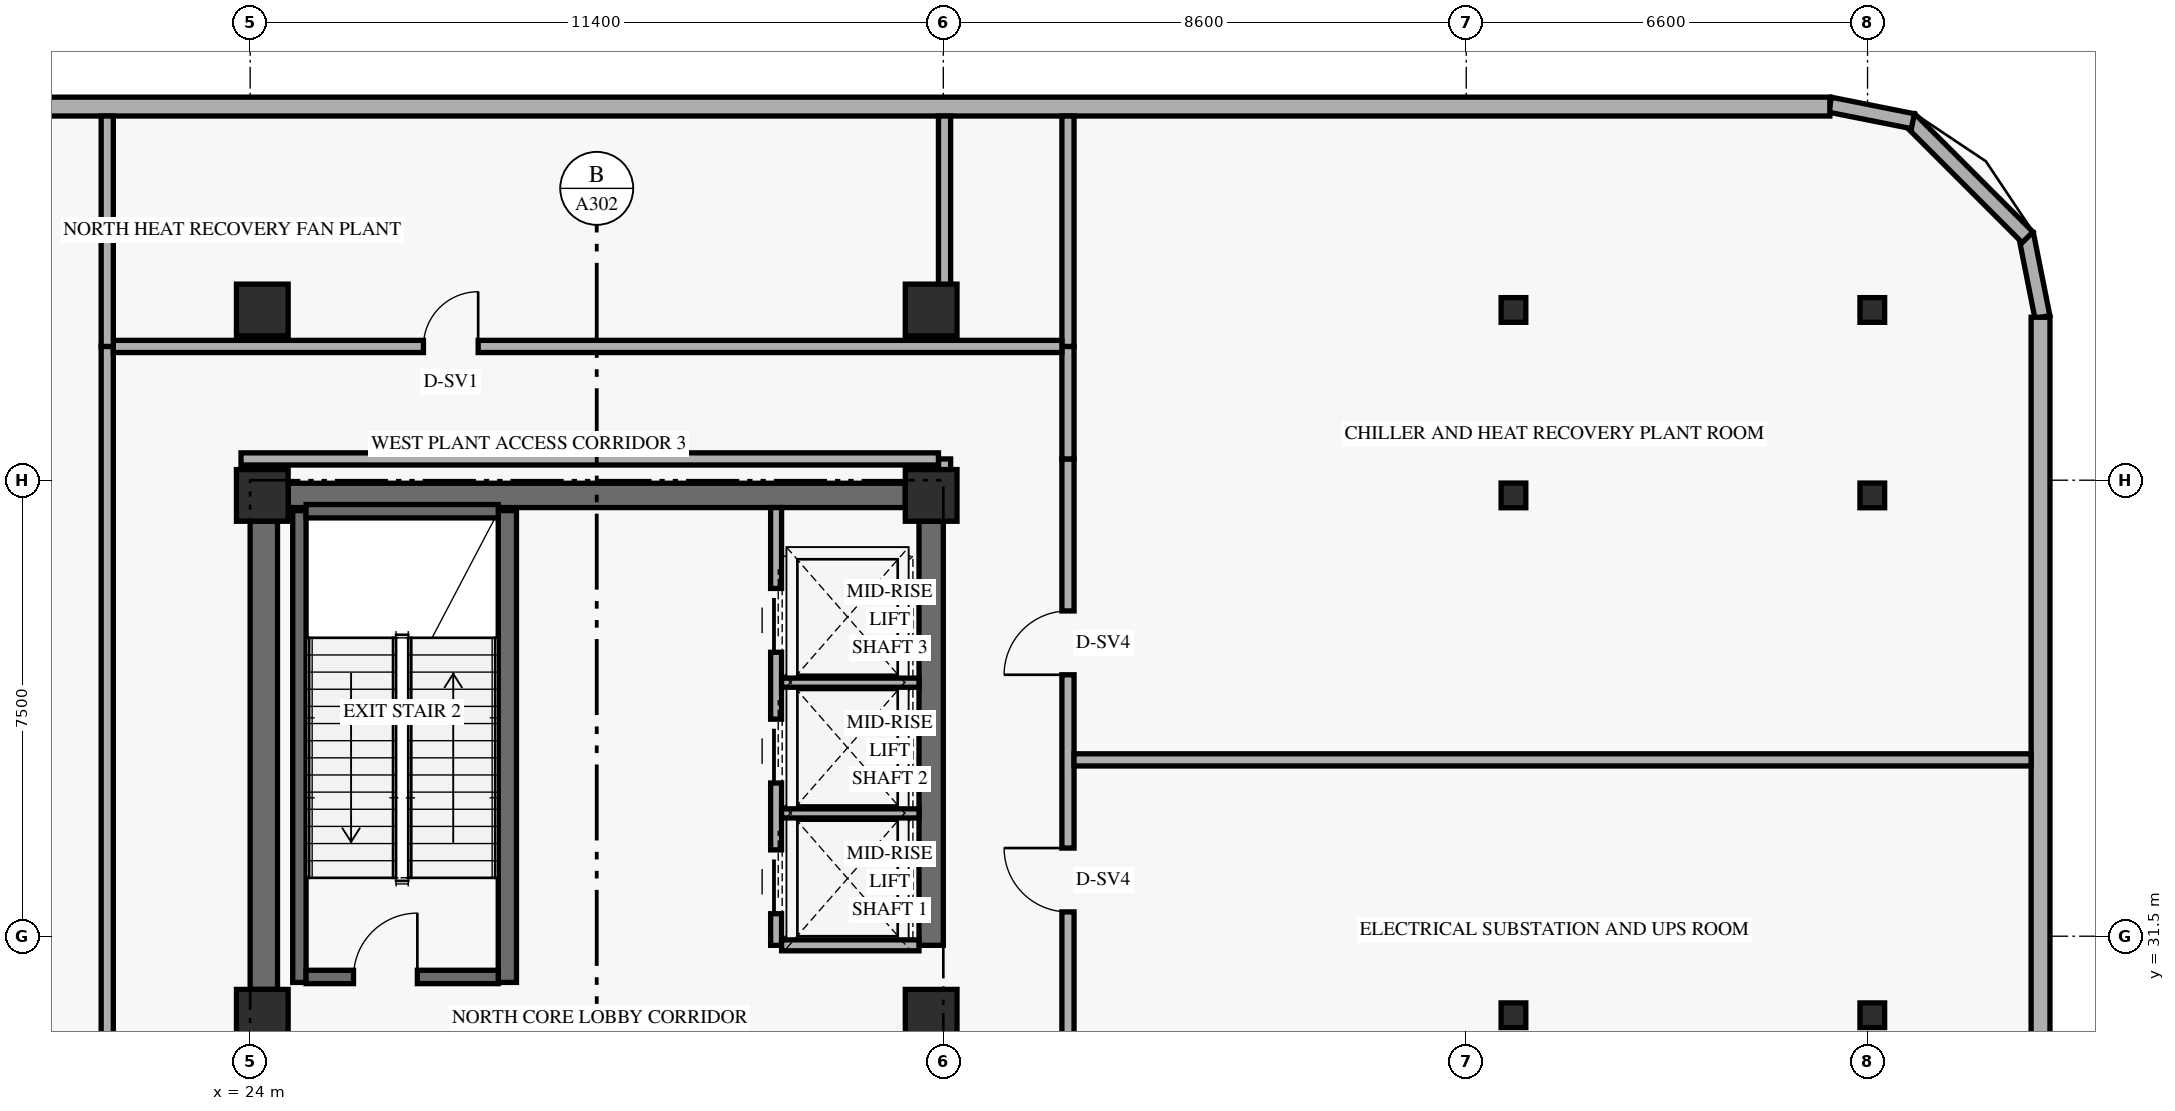
"""IFC4 building model, lengths in metres.
Left out: names, types, materials, properties, quantities, classifications, styles, units other than length and angle.
Written with IfcOpenShell. Run it as: python <this file> out.ifc"""

import sys

from ifc_helpers import new_model, si_unit, direction, frame, frame_2d, origin, origin_2d, place, context, subcontext, project, spatial, rectangle, hollow_rectangle, extrude, element, fill, save


model = new_model("IFC4")
c1 = context("Model", 3, precision=1e-05, world=origin(), true_north=direction((0.0, 1.0)))
c2 = subcontext(c1, "Body", "Model", "MODEL_VIEW")
j1 = project(units=[si_unit("LENGTHUNIT", "METRE"), si_unit("PLANEANGLEUNIT", "RADIAN")], contexts=[c1])
p1 = place(None, origin())
s1 = spatial("IfcSite", under=j1, at=p1, CompositionType="ELEMENT")
p2 = place(p1, origin())
s2 = spatial("IfcBuilding", under=s1, at=p2, CompositionType="ELEMENT")
p3 = place(p2, frame((0.0, 0.0, 135.6)))
s3 = spatial("IfcBuildingStorey", under=s2, at=p3, CompositionType="ELEMENT", Elevation=135.6)
p4 = place(p3, frame((24.225, 30.625, 0.0), z_axis=(0.0, 0.0, 1.0), x_axis=(0.0, 1.0, 0.0)))
e1 = element("IfcWall", 1, at=p4, inside=s3, PredefinedType="SHEAR", context=c2, shape_type="SweptSolid", body=[
    extrude(rectangle(XDim=7.7, YDim=0.45, at=frame_2d((3.85, 0.0))), origin(), (0.0, 0.0, 1.0), 4.549),
])
p5 = place(p3, frame((35.2, 31.35, 0.0), z_axis=(0.0, 0.0, 1.0), x_axis=(0.0, 1.0, 0.0)))
e2 = element("IfcWall", 2, at=p5, inside=s3, PredefinedType="SHEAR", context=c2, shape_type="SweptSolid", body=[
    extrude(rectangle(XDim=6.975, YDim=0.4, at=frame_2d((3.487, 0.0))), origin(), (0.0, 0.0, 1.0), 4.549),
])
p6 = place(p3, frame((24.625, 38.75, 0.0), z_axis=(0.0, 0.0, 1.0), x_axis=(1.0, 0.0, 0.0)))
e3 = element("IfcWall", 3, at=p6, inside=s3, PredefinedType="SHEAR", context=c2, shape_type="SweptSolid", body=[
    extrude(rectangle(XDim=10.15, YDim=0.4, at=frame_2d((5.075, 0.0))), origin(), (0.0, 0.0, 1.0), 5.16),
])
p7 = place(p3, frame((24.81, 30.74, 0.0), z_axis=(0.0, 0.0, 1.0), x_axis=(0.0, 1.0, 0.0)))
e4 = element("IfcWall", 4, at=p7, inside=s3, PredefinedType="SHEAR", context=c2, shape_type="SweptSolid", body=[
    extrude(rectangle(XDim=7.76, YDim=0.22, at=frame_2d((3.88, 0.0))), origin(), (0.0, 0.0, 1.0), 5.16),
])
p8 = place(p3, frame((28.23, 30.74, 0.0), z_axis=(0.0, 0.0, 1.0), x_axis=(0.0, 1.0, 0.0)))
e5 = element("IfcWall", 5, at=p8, inside=s3, PredefinedType="SHEAR", context=c2, shape_type="SweptSolid", body=[
    extrude(rectangle(XDim=7.76, YDim=0.3, at=frame_2d((3.88, 0.0))), origin(), (0.0, 0.0, 1.0), 5.16),
])
p9 = place(p3, frame((24.92, 30.83, 0.0), z_axis=(0.0, 0.0, 1.0), x_axis=(1.0, 0.0, 0.0)))
e6 = element("IfcWall", 6, at=p9, inside=s3, PredefinedType="SHEAR", context=c2, shape_type="SweptSolid", body=[
    extrude(rectangle(XDim=3.16, YDim=0.22, at=frame_2d((1.58, 0.0))), origin(), (0.0, 0.0, 1.0), 5.16),
])
p10 = place(p9, frame((0.78, 0.0, 0.0)))
e7 = element("IfcOpeningElement", 7, at=p10, cuts=e6, PredefinedType="OPENING", context=c2, shape_type="SweptSolid", body=[
    extrude(rectangle(XDim=1.05, YDim=2.15, at=frame_2d((0.525, 1.075))), frame((0.0, 0.12, 0.0), z_axis=(0.0, -1.0, 0.0), x_axis=(1.0, 0.0, 0.0)), (0.0, 0.0, 1.0), 0.24),
])
p11 = place(p3, frame((24.92, 38.49, 0.0), z_axis=(0.0, 0.0, 1.0), x_axis=(1.0, 0.0, 0.0)))
e8 = element("IfcWall", 8, at=p11, inside=s3, PredefinedType="SHEAR", context=c2, shape_type="SweptSolid", body=[
    extrude(rectangle(XDim=3.16, YDim=0.22, at=frame_2d((1.58, 0.0))), origin(), (0.0, 0.0, 1.0), 5.16),
])
for number, where, z_axis, x_axis in (
    (9, (24.2, 30.2, 0.0), (0.0, 0.0, 1.0), (1.0, 0.0, 0.0)),
    (10, (24.2, 38.75, 0.0), (0.0, 0.0, 1.0), (1.0, 0.0, 0.0)),
    (11, (24.2, 41.8, 0.0), (0.0, 0.0, 1.0), (1.0, 0.0, 0.0)),
    (12, (35.2, 30.2, 0.0), (0.0, 0.0, 1.0), (1.0, 0.0, 0.0)),
    (13, (35.2, 38.75, 0.0), (0.0, 0.0, 1.0), (1.0, 0.0, 0.0)),
    (14, (35.2, 41.8, 0.0), (0.0, 0.0, 1.0), (1.0, 0.0, 0.0)),
):
    element("IfcColumn", number, at=place(p3, frame(where, z_axis=z_axis, x_axis=x_axis)), inside=s3, PredefinedType="COLUMN", context=c2, shape_type="SweptSolid", body=[
        extrude(rectangle(XDim=0.85, YDim=0.85, at=origin_2d()), origin(), (0.0, 0.0, 1.0), 5.4),
    ])
for number, where, z_axis, x_axis in (
    (15, (44.682, 30.2, 0.0), (0.035, 0.0, 0.999), (0.0, 1.0, 0.0)),
    (16, (44.682, 38.75, 0.0), (0.035, 0.0, 0.999), (0.0, 1.0, 0.0)),
    (17, (44.682, 41.8, 0.0), (0.035, 0.0, 0.999), (0.0, 1.0, 0.0)),
):
    element("IfcColumn", number, at=place(p3, frame(where, z_axis=z_axis, x_axis=x_axis)), inside=s3, PredefinedType="COLUMN", context=c2, shape_type="SweptSolid", body=[
        extrude(hollow_rectangle(XDim=0.406, YDim=0.406, WallThickness=0.016, at=origin_2d()), origin(), (0.0, 0.0, 1.0), 5.403),
    ])
for number, where, z_axis, x_axis in (
    (18, (50.521, 30.2, 0.0), (0.058, 0.0, 0.998), (0.0, 1.0, 0.0)),
    (19, (50.521, 38.75, 0.0), (0.058, 0.0, 0.998), (0.0, 1.0, 0.0)),
    (20, (50.521, 41.8, 0.0), (0.058, 0.0, 0.998), (0.0, 1.0, 0.0)),
):
    element("IfcColumn", number, at=place(p3, frame(where, z_axis=z_axis, x_axis=x_axis)), inside=s3, PredefinedType="COLUMN", context=c2, shape_type="SweptSolid", body=[
        extrude(hollow_rectangle(XDim=0.406, YDim=0.406, WallThickness=0.016, at=origin_2d()), origin(), (0.0, 0.0, 1.0), 5.409),
    ])
p12 = place(p3, frame((53.476, 41.684, 0.0), z_axis=(0.0, 0.0, 1.0), x_axis=(-0.195000137217, 0.980803214965, 0.0)))
e21 = element("IfcWall", 21, at=p12, inside=s3, PredefinedType="SOLIDWALL", context=c2, shape_type="SweptSolid", body=[
    extrude(rectangle(XDim=1.388, YDim=0.25, at=frame_2d((0.694, 0.0))), origin(), (0.0, 0.0, 1.0), 5.16),
])
p13 = place(p3, frame((53.232, 42.995, 0.0), z_axis=(0.0, 0.0, 1.0), x_axis=(-0.707151344399, 0.707062215165, 0.0)))
e22 = element("IfcWall", 22, at=p13, inside=s3, PredefinedType="SOLIDWALL", context=c2, shape_type="SweptSolid", body=[
    extrude(rectangle(XDim=2.739, YDim=0.25, at=frame_2d((1.37, 0.0))), origin(), (0.0, 0.0, 1.0), 5.16),
])
p14 = place(p3, frame((51.345, 44.905, 0.0), z_axis=(0.0, 0.0, 1.0), x_axis=(-0.980809899341, 0.19496651342, 0.0)))
e23 = element("IfcWall", 23, at=p14, inside=s3, PredefinedType="SOLIDWALL", context=c2, shape_type="SweptSolid", body=[
    extrude(rectangle(XDim=1.389, YDim=0.25, at=frame_2d((0.694, 0.0))), origin(), (0.0, 0.0, 1.0), 5.16),
])
p15 = place(p3, frame((53.445, 6.32, 0.0), z_axis=(0.0, 0.0, 1.0), x_axis=(0.0, 1.0, 0.0)))
e24 = element("IfcWall", 24, at=p15, inside=s3, PredefinedType="SOLIDWALL", context=c2, shape_type="SweptSolid", body=[
    extrude(rectangle(XDim=35.36, YDim=0.31, at=frame_2d((17.68, 0.0))), origin(), (0.0, 0.0, 1.0), 5.16),
])
p16 = place(p3, frame((49.98, 45.145, 0.0), z_axis=(0.0, 0.0, 1.0), x_axis=(-1.0, 0.0, 0.0)))
e25 = element("IfcWall", 25, at=p16, inside=s3, PredefinedType="SOLIDWALL", context=c2, shape_type="SweptSolid", body=[
    extrude(rectangle(XDim=36.56, YDim=0.31, at=frame_2d((18.28, 0.0))), origin(), (0.0, 0.0, 1.0), 5.16),
])
p17 = place(p3, frame((32.65, 31.35, 0.0), z_axis=(0.0, 0.0, 1.0), x_axis=(0.0, 1.0, 0.0)))
e26 = element("IfcWall", 26, at=p17, inside=s3, PredefinedType="STANDARD", context=c2, shape_type="SweptSolid", body=[
    extrude(rectangle(XDim=7.2, YDim=0.18, at=frame_2d((3.6, 0.0))), origin(), (0.0, 0.0, 1.0), 5.16),
])
p18 = place(p17, frame((0.52, 0.0, 0.0)))
e27 = element("IfcOpeningElement", 27, at=p18, cuts=e26, PredefinedType="OPENING", context=c2, shape_type="SweptSolid", body=[
    extrude(rectangle(XDim=1.05, YDim=2.2, at=frame_2d((0.525, 1.1))), frame((0.0, 0.1, 0.0), z_axis=(0.0, -1.0, 0.0), x_axis=(1.0, 0.0, 0.0)), (0.0, 0.0, 1.0), 0.2),
])
p19 = place(p17, frame((2.67, 0.0, 0.0)))
e28 = element("IfcOpeningElement", 28, at=p19, cuts=e26, PredefinedType="OPENING", context=c2, shape_type="SweptSolid", body=[
    extrude(rectangle(XDim=1.05, YDim=2.2, at=frame_2d((0.525, 1.1))), frame((0.0, 0.1, 0.0), z_axis=(0.0, -1.0, 0.0), x_axis=(1.0, 0.0, 0.0)), (0.0, 0.0, 1.0), 0.2),
])
p20 = place(p17, frame((4.82, 0.0, 0.0)))
e29 = element("IfcOpeningElement", 29, at=p20, cuts=e26, PredefinedType="OPENING", context=c2, shape_type="SweptSolid", body=[
    extrude(rectangle(XDim=1.05, YDim=2.2, at=frame_2d((0.525, 1.1))), frame((0.0, 0.1, 0.0), z_axis=(0.0, -1.0, 0.0), x_axis=(1.0, 0.0, 0.0)), (0.0, 0.0, 1.0), 0.2),
])
p21 = place(p3, frame((32.74, 31.35, 0.0), z_axis=(0.0, 0.0, 1.0), x_axis=(1.0, 0.0, 0.0)))
e30 = element("IfcWall", 30, at=p21, inside=s3, PredefinedType="STANDARD", context=c2, shape_type="SweptSolid", body=[
    extrude(rectangle(XDim=2.26, YDim=0.18, at=frame_2d((1.13, 0.0))), origin(), (0.0, 0.0, 1.0), 5.16),
])
for number, where, z_axis, x_axis in (
    (31, (32.74, 33.52, 0.0), (0.0, 0.0, 1.0), (1.0, 0.0, 0.0)),
    (32, (32.74, 35.67, 0.0), (0.0, 0.0, 1.0), (1.0, 0.0, 0.0)),
):
    element("IfcWall", number, at=place(p3, frame(where, z_axis=z_axis, x_axis=x_axis)), inside=s3, PredefinedType="STANDARD", context=c2, shape_type="SweptSolid", body=[
        extrude(rectangle(XDim=2.26, YDim=0.15, at=frame_2d((1.13, 0.0))), origin(), (0.0, 0.0, 1.0), 5.16),
    ])
p22 = place(p3, frame((37.45, 8.65, 0.0), z_axis=(0.0, 0.0, 1.0), x_axis=(0.0, 1.0, 0.0)))
e33 = element("IfcWall", 33, at=p22, inside=s3, PredefinedType="STANDARD", context=c2, shape_type="SweptSolid", body=[
    extrude(rectangle(XDim=30.7, YDim=0.2, at=frame_2d((15.35, 0.0))), origin(), (0.0, 0.0, 1.0), 4.531),
])
p23 = place(p22, frame((11.75, 0.0, 0.0)))
e34 = element("IfcOpeningElement", 34, at=p23, cuts=e33, PredefinedType="OPENING", context=c2, shape_type="SweptSolid", body=[
    extrude(rectangle(XDim=1.05, YDim=2.15, at=frame_2d((0.525, 1.075))), frame((0.0, 0.11, 0.0), z_axis=(0.0, -1.0, 0.0), x_axis=(1.0, 0.0, 0.0)), (0.0, 0.0, 1.0), 0.22),
])
p24 = place(p22, frame((5.75, 0.0, 0.0)))
e35 = element("IfcOpeningElement", 35, at=p24, cuts=e33, PredefinedType="OPENING", context=c2, shape_type="SweptSolid", body=[
    extrude(rectangle(XDim=1.0, YDim=2.15, at=frame_2d((0.5, 1.075))), frame((0.0, 0.11, 0.0), z_axis=(0.0, -1.0, 0.0), x_axis=(1.0, 0.0, 0.0)), (0.0, 0.0, 1.0), 0.22),
])
p25 = place(p22, frame((16.75, 0.0, 0.0)))
e36 = element("IfcOpeningElement", 36, at=p25, cuts=e33, PredefinedType="OPENING", context=c2, shape_type="SweptSolid", body=[
    extrude(rectangle(XDim=1.05, YDim=2.15, at=frame_2d((0.525, 1.075))), frame((0.0, 0.11, 0.0), z_axis=(0.0, -1.0, 0.0), x_axis=(1.0, 0.0, 0.0)), (0.0, 0.0, 1.0), 0.22),
])
p26 = place(p22, frame((23.25, 0.0, 0.0)))
e37 = element("IfcOpeningElement", 37, at=p26, cuts=e33, PredefinedType="OPENING", context=c2, shape_type="SweptSolid", body=[
    extrude(rectangle(XDim=1.05, YDim=2.15, at=frame_2d((0.525, 1.075))), frame((0.0, 0.11, 0.0), z_axis=(0.0, -1.0, 0.0), x_axis=(1.0, 0.0, 0.0)), (0.0, 0.0, 1.0), 0.22),
])
p27 = place(p22, frame((27.15, 0.0, 0.0)))
e38 = element("IfcOpeningElement", 38, at=p27, cuts=e33, PredefinedType="OPENING", context=c2, shape_type="SweptSolid", body=[
    extrude(rectangle(XDim=1.05, YDim=2.15, at=frame_2d((0.525, 1.075))), frame((0.0, 0.11, 0.0), z_axis=(0.0, -1.0, 0.0), x_axis=(1.0, 0.0, 0.0)), (0.0, 0.0, 1.0), 0.22),
])
p28 = place(p3, frame((37.45, 39.35, 0.0), z_axis=(0.0, 0.0, 1.0), x_axis=(0.0, 1.0, 0.0)))
e39 = element("IfcWall", 39, at=p28, inside=s3, PredefinedType="STANDARD", context=c2, shape_type="SweptSolid", body=[
    extrude(rectangle(XDim=1.85, YDim=0.2, at=frame_2d((0.925, 0.0))), origin(), (0.0, 0.0, 1.0), 5.16),
])
p29 = place(p3, frame((37.45, 41.2, 0.0), z_axis=(0.0, 0.0, 1.0), x_axis=(0.0, 1.0, 0.0)))
e40 = element("IfcWall", 40, at=p29, inside=s3, PredefinedType="STANDARD", context=c2, shape_type="SweptSolid", body=[
    extrude(rectangle(XDim=3.79, YDim=0.2, at=frame_2d((1.895, 0.0))), origin(), (0.0, 0.0, 1.0), 4.609),
])
p30 = place(p3, frame((35.42, 38.75, 0.0), z_axis=(0.0, 0.0, 1.0), x_axis=(0.0, 1.0, 0.0)))
e41 = element("IfcWall", 41, at=p30, inside=s3, PredefinedType="STANDARD", context=c2, shape_type="SweptSolid", body=[
    extrude(rectangle(XDim=0.6, YDim=0.2, at=frame_2d((0.3, 0.0))), origin(), (0.0, 0.0, 1.0), 4.531),
])
p31 = place(p3, frame((35.42, 41.2, 0.0), z_axis=(0.0, 0.0, 1.0), x_axis=(0.0, 1.0, 0.0)))
e42 = element("IfcWall", 42, at=p31, inside=s3, PredefinedType="STANDARD", context=c2, shape_type="SweptSolid", body=[
    extrude(rectangle(XDim=3.79, YDim=0.2, at=frame_2d((1.895, 0.0))), origin(), (0.0, 0.0, 1.0), 4.531),
])
p32 = place(p3, frame((37.55, 34.4, 0.0), z_axis=(0.0, 0.0, 1.0), x_axis=(1.0, 0.0, 0.0)))
e43 = element("IfcWall", 43, at=p32, inside=s3, PredefinedType="STANDARD", context=c2, shape_type="SweptSolid", body=[
    extrude(rectangle(XDim=15.74, YDim=0.2, at=frame_2d((7.87, 0.0))), origin(), (0.0, 0.0, 1.0), 4.531),
])
p33 = place(p3, frame((21.65, 6.8, 0.0), z_axis=(0.0, 0.0, 1.0), x_axis=(0.0, 1.0, 0.0)))
e44 = element("IfcWall", 44, at=p33, inside=s3, PredefinedType="STANDARD", context=c2, shape_type="SweptSolid", body=[
    extrude(rectangle(XDim=34.4, YDim=0.2, at=frame_2d((17.2, 0.0))), origin(), (0.0, 0.0, 1.0), 4.531),
])
p34 = place(p33, frame((7.0, 0.0, 0.0)))
e45 = element("IfcOpeningElement", 45, at=p34, cuts=e44, PredefinedType="OPENING", context=c2, shape_type="SweptSolid", body=[
    extrude(rectangle(XDim=1.05, YDim=2.15, at=frame_2d((0.525, 1.075))), frame((0.0, 0.11, 0.0), z_axis=(0.0, -1.0, 0.0), x_axis=(1.0, 0.0, 0.0)), (0.0, 0.0, 1.0), 0.22),
])
p35 = place(p33, frame((21.0, 0.0, 0.0)))
e46 = element("IfcOpeningElement", 46, at=p35, cuts=e44, PredefinedType="OPENING", context=c2, shape_type="SweptSolid", body=[
    extrude(rectangle(XDim=1.05, YDim=2.15, at=frame_2d((0.525, 1.075))), frame((0.0, 0.11, 0.0), z_axis=(0.0, -1.0, 0.0), x_axis=(1.0, 0.0, 0.0)), (0.0, 0.0, 1.0), 0.22),
])
p36 = place(p3, frame((21.75, 41.2, 0.0), z_axis=(0.0, 0.0, 1.0), x_axis=(1.0, 0.0, 0.0)))
e47 = element("IfcWall", 47, at=p36, inside=s3, PredefinedType="STANDARD", context=c2, shape_type="SweptSolid", body=[
    extrude(rectangle(XDim=15.6, YDim=0.2, at=frame_2d((7.8, 0.0))), origin(), (0.0, 0.0, 1.0), 4.531),
])
p37 = place(p36, frame((5.1, 0.0, 0.0)))
e48 = element("IfcOpeningElement", 48, at=p37, cuts=e47, PredefinedType="OPENING", context=c2, shape_type="SweptSolid", body=[
    extrude(rectangle(XDim=0.9, YDim=2.1, at=frame_2d((0.45, 1.05))), frame((0.0, 0.11, 0.0), z_axis=(0.0, -1.0, 0.0), x_axis=(1.0, 0.0, 0.0)), (0.0, 0.0, 1.0), 0.22),
])
p38 = place(p3, frame((23.85, 39.35, 0.0), z_axis=(0.0, 0.0, 1.0), x_axis=(1.0, 0.0, 0.0)))
e49 = element("IfcWall", 49, at=p38, inside=s3, PredefinedType="STANDARD", context=c2, shape_type="SweptSolid", body=[
    extrude(rectangle(XDim=11.47, YDim=0.2, at=frame_2d((5.735, 0.0))), origin(), (0.0, 0.0, 1.0), 4.531),
])
p39 = place(p3, frame((21.65, 41.2, 0.0), z_axis=(0.0, 0.0, 1.0), x_axis=(0.0, 1.0, 0.0)))
e50 = element("IfcWall", 50, at=p39, inside=s3, PredefinedType="STANDARD", context=c2, shape_type="SweptSolid", body=[
    extrude(rectangle(XDim=3.79, YDim=0.2, at=frame_2d((1.895, 0.0))), origin(), (0.0, 0.0, 1.0), 4.609),
])
p40 = place(p10, origin())
e51 = element("IfcDoor", 51, at=p40, inside=s3, OperationType="SINGLE_SWING_RIGHT", PredefinedType="DOOR", context=c2, shape_type="SweptSolid", body=[
    extrude(rectangle(XDim=1.05, YDim=2.15, at=frame_2d((0.525, 1.075))), frame((0.0, 0.025, 0.0), z_axis=(0.0, -1.0, 0.0), x_axis=(1.0, 0.0, 0.0)), (0.0, 0.0, 1.0), 0.05),
])
fill(e7, e51)
p41 = place(p18, origin())
e52 = element("IfcDoor", 52, at=p41, inside=s3, OperationType="SLIDING_TO_LEFT", PredefinedType="DOOR", context=c2, shape_type="SweptSolid", body=[
    extrude(rectangle(XDim=1.05, YDim=2.2, at=frame_2d((0.525, 1.1))), frame((0.0, 0.025, 0.0), z_axis=(0.0, -1.0, 0.0), x_axis=(1.0, 0.0, 0.0)), (0.0, 0.0, 1.0), 0.05),
])
fill(e27, e52)
p42 = place(p19, origin())
e53 = element("IfcDoor", 53, at=p42, inside=s3, OperationType="SLIDING_TO_LEFT", PredefinedType="DOOR", context=c2, shape_type="SweptSolid", body=[
    extrude(rectangle(XDim=1.05, YDim=2.2, at=frame_2d((0.525, 1.1))), frame((0.0, 0.025, 0.0), z_axis=(0.0, -1.0, 0.0), x_axis=(1.0, 0.0, 0.0)), (0.0, 0.0, 1.0), 0.05),
])
fill(e28, e53)
p43 = place(p20, origin())
e54 = element("IfcDoor", 54, at=p43, inside=s3, OperationType="SLIDING_TO_LEFT", PredefinedType="DOOR", context=c2, shape_type="SweptSolid", body=[
    extrude(rectangle(XDim=1.05, YDim=2.2, at=frame_2d((0.525, 1.1))), frame((0.0, 0.025, 0.0), z_axis=(0.0, -1.0, 0.0), x_axis=(1.0, 0.0, 0.0)), (0.0, 0.0, 1.0), 0.05),
])
fill(e29, e54)
p44 = place(p26, origin())
e55 = element("IfcDoor", 55, at=p44, inside=s3, OperationType="SINGLE_SWING_RIGHT", PredefinedType="DOOR", context=c2, shape_type="SweptSolid", body=[
    extrude(rectangle(XDim=1.05, YDim=2.15, at=frame_2d((0.525, 1.075))), frame((0.0, 0.025, 0.0), z_axis=(0.0, -1.0, 0.0), x_axis=(1.0, 0.0, 0.0)), (0.0, 0.0, 1.0), 0.05),
])
fill(e37, e55)
p45 = place(p27, origin())
e56 = element("IfcDoor", 56, at=p45, inside=s3, OperationType="SINGLE_SWING_LEFT", PredefinedType="DOOR", context=c2, shape_type="SweptSolid", body=[
    extrude(rectangle(XDim=1.05, YDim=2.15, at=frame_2d((0.525, 1.075))), frame((0.0, 0.025, 0.0), z_axis=(0.0, -1.0, 0.0), x_axis=(1.0, 0.0, 0.0)), (0.0, 0.0, 1.0), 0.05),
])
fill(e38, e56)
p46 = place(p37, origin())
e57 = element("IfcDoor", 57, at=p46, inside=s3, OperationType="SINGLE_SWING_RIGHT", PredefinedType="DOOR", context=c2, shape_type="SweptSolid", body=[
    extrude(rectangle(XDim=0.9, YDim=2.1, at=frame_2d((0.45, 1.05))), frame((0.0, 0.025, 0.0), z_axis=(0.0, -1.0, 0.0), x_axis=(1.0, 0.0, 0.0)), (0.0, 0.0, 1.0), 0.05),
])
fill(e48, e57)
save(model, sys.argv[1])
